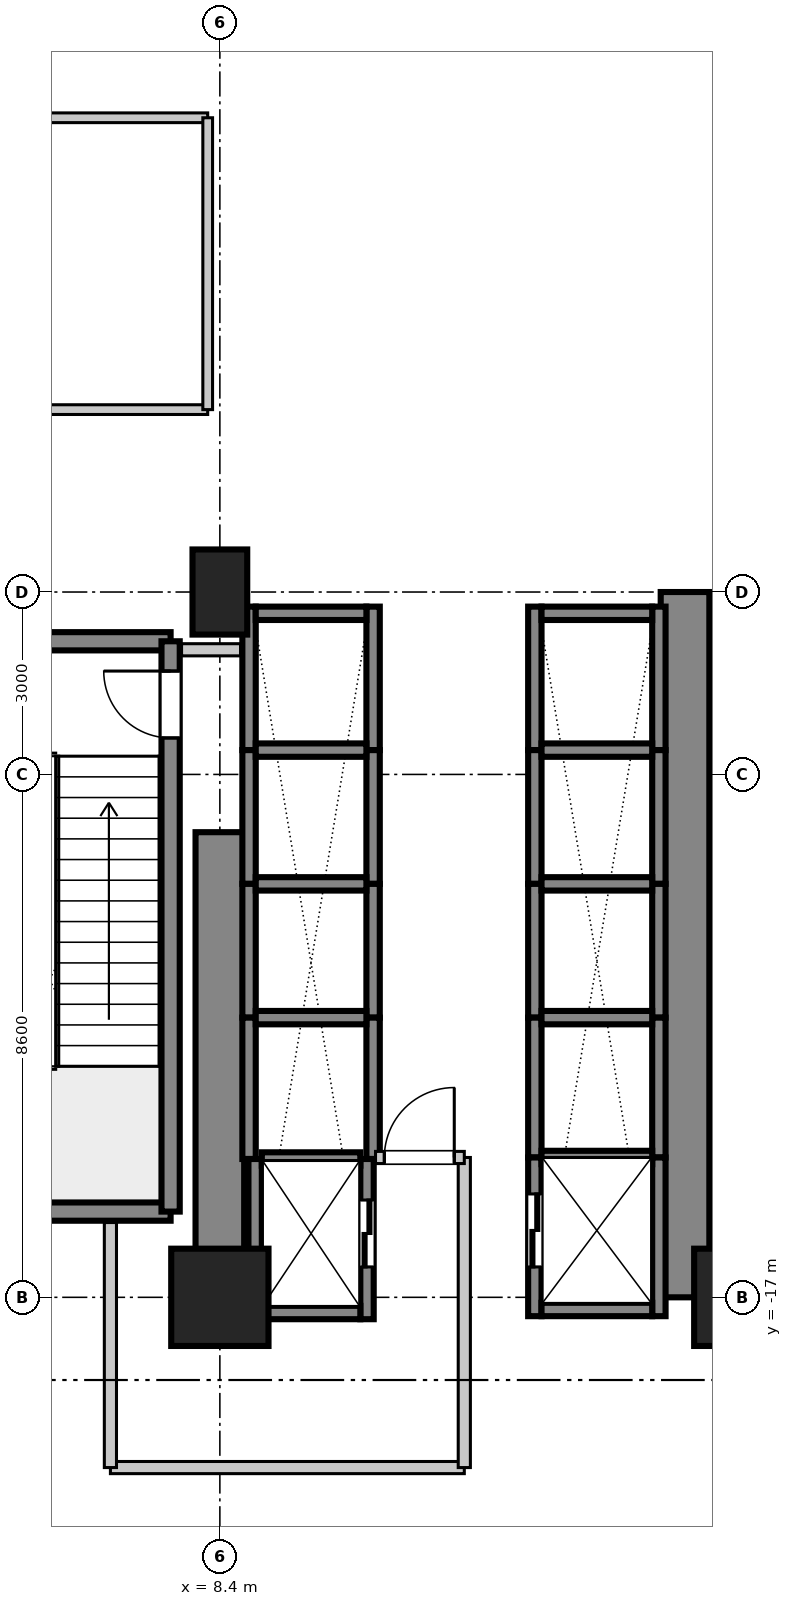
"""IFC4 building model, lengths in metres.
Left out: names, types, materials, properties, quantities, classifications, styles, units other than length and angle.
Written with IfcOpenShell. Run it as: python <this file> out.ifc"""

import sys

from ifc_helpers import new_model, si_unit, direction, frame, frame_2d, origin, origin_2d, place, context, subcontext, project, spatial, rectangle, extrude, source, transform, mapped, element, fill, save


model = new_model("IFC4")
c1 = context("Model", 3, precision=1e-05, world=origin(), true_north=direction((0.0, 1.0)))
c2 = subcontext(c1, "Body", "Model", "MODEL_VIEW")
j1 = project(units=[si_unit("LENGTHUNIT", "METRE"), si_unit("PLANEANGLEUNIT", "RADIAN")], contexts=[c1])
p1 = place(None, origin())
s1 = spatial("IfcSite", under=j1, at=p1, CompositionType="ELEMENT")
p2 = place(p1, origin())
s2 = spatial("IfcBuilding", under=s1, at=p2, CompositionType="ELEMENT")
p3 = place(p2, frame((0.0, 0.0, 27.0)))
s3 = spatial("IfcBuildingStorey", under=s2, at=p3, CompositionType="ELEMENT", Elevation=27.0)
m1 = source(origin(), c2, "Body", "SweptSolid", [
    extrude(rectangle(XDim=1.6, YDim=1.6, at=origin_2d()), origin(), (0.0, 0.0, 1.0), 5.355),
])
p4 = place(p3, frame((8.4, -17.0, 0.0), z_axis=(0.0, 0.0, 1.0), x_axis=(1.0, 0.0, 0.0)))
e1 = element("IfcColumn", 1, at=p4, inside=s3, PredefinedType="COLUMN", context=c2, shape_type="MappedRepresentation", body=[
    mapped(m1, transform((0.0, 0.0, 0.0), scale=1.0)),
])
m2 = source(origin(), c2, "Body", "SweptSolid", [
    extrude(rectangle(XDim=0.9, YDim=1.4, at=origin_2d()), origin(), (0.0, 0.0, 1.0), 5.355),
])
p5 = place(p3, frame((8.4, -5.4, 0.0), z_axis=(0.0, 0.0, 1.0), x_axis=(1.0, 0.0, 0.0)))
e2 = element("IfcColumn", 2, at=p5, inside=s3, PredefinedType="PILASTER", context=c2, shape_type="MappedRepresentation", body=[
    mapped(m2, transform((0.0, 0.0, 0.0), scale=1.0)),
])
p6 = place(p3, frame((17.0, -17.0, 0.0), z_axis=(0.0, 0.0, 1.0), x_axis=(1.0, 0.0, 0.0)))
e3 = element("IfcColumn", 3, at=p6, inside=s3, PredefinedType="COLUMN", context=c2, shape_type="MappedRepresentation", body=[
    mapped(m1, transform((0.0, 0.0, 0.0), scale=1.0)),
])
m3 = source(origin(), c2, "Body", "SweptSolid", [
    extrude(rectangle(XDim=7.65, YDim=0.8, at=frame_2d((3.825, 0.0))), origin(), (0.0, 0.0, 1.0), 5.12),
])
p7 = place(p3, frame((8.4, -17.0, 0.0), z_axis=(0.0, 0.0, 1.0), x_axis=(0.0, 1.0, 0.0)))
e4 = element("IfcWall", 4, at=p7, inside=s3, PredefinedType="SHEAR", context=c2, shape_type="MappedRepresentation", body=[
    mapped(m3, transform((0.0, 0.0, 0.0), scale=1.0)),
])
m4 = source(origin(), c2, "Body", "SweptSolid", [
    extrude(rectangle(XDim=11.6, YDim=0.8, at=frame_2d((5.8, 0.0))), origin(), (0.0, 0.0, 1.0), 5.12),
])
p8 = place(p3, frame((16.05, -17.0, 0.0), z_axis=(0.0, 0.0, 1.0), x_axis=(0.0, 1.0, 0.0)))
e5 = element("IfcWall", 5, at=p8, inside=s3, PredefinedType="SHEAR", context=c2, shape_type="MappedRepresentation", body=[
    mapped(m4, transform((0.0, 0.0, 0.0), scale=1.0)),
])
m5 = source(origin(), c2, "Body", "SweptSolid", [
    extrude(rectangle(XDim=3.98, YDim=0.3, at=frame_2d((1.99, 0.0))), origin(), (0.0, 0.0, 1.0), 5.12),
])
for number, where, z_axis, x_axis in (
    (6, (3.61, -15.59, 0.0), (0.0, 0.0, 1.0), (1.0, 0.0, 0.0)),
    (7, (3.61, -6.21, 0.0), (0.0, 0.0, 1.0), (1.0, 0.0, 0.0)),
):
    element("IfcWall", number, at=place(p3, frame(where, z_axis=z_axis, x_axis=x_axis)), inside=s3, PredefinedType="SHEAR", context=c2, shape_type="MappedRepresentation", body=[
        mapped(m5, transform((0.0, 0.0, 0.0), scale=1.0)),
    ])
m6 = source(origin(), c2, "Body", "SweptSolid", [
    extrude(rectangle(XDim=9.38, YDim=0.3, at=frame_2d((4.69, 0.0))), origin(), (0.0, 0.0, 1.0), 5.12),
])
p9 = place(p3, frame((7.59, -15.59, 0.0), z_axis=(0.0, 0.0, 1.0), x_axis=(0.0, 1.0, 0.0)))
e8 = element("IfcWall", 8, at=p9, inside=s3, PredefinedType="SHEAR", context=c2, shape_type="MappedRepresentation", body=[
    mapped(m6, transform((0.0, 0.0, 0.0), scale=1.0)),
])
p10 = place(p9, frame((7.79, 0.0, 0.0)))
e9 = element("IfcOpeningElement", 9, at=p10, cuts=e8, PredefinedType="OPENING", context=c2, shape_type="SweptSolid", body=[
    extrude(rectangle(XDim=1.1, YDim=2.15, at=frame_2d((0.55, 1.075))), frame((0.0, 0.16, 0.0), z_axis=(0.0, -1.0, 0.0), x_axis=(1.0, 0.0, 0.0)), (0.0, 0.0, 1.0), 0.32),
])
m7 = source(origin(), c2, "Body", "SweptSolid", [
    extrude(rectangle(XDim=2.36, YDim=0.22, at=frame_2d((1.18, 0.0))), origin(), (0.0, 0.0, 1.0), 5.12),
])
for number, where, z_axis, x_axis in (
    (10, (13.58, -8.0, 0.0), (0.0, 0.0, 1.0), (0.0, 1.0, 0.0)),
    (11, (15.62, -8.0, 0.0), (0.0, 0.0, 1.0), (0.0, 1.0, 0.0)),
):
    element("IfcWall", number, at=place(p3, frame(where, z_axis=z_axis, x_axis=x_axis)), inside=s3, PredefinedType="SHEAR", context=c2, shape_type="MappedRepresentation", body=[
        mapped(m7, transform((0.0, 0.0, 0.0), scale=1.0)),
    ])
m8 = source(origin(), c2, "Body", "SweptSolid", [
    extrude(rectangle(XDim=1.82, YDim=0.22, at=frame_2d((0.91, 0.0))), origin(), (0.0, 0.0, 1.0), 5.12),
])
p11 = place(p3, frame((13.69, -5.75, 0.0), z_axis=(0.0, 0.0, 1.0), x_axis=(1.0, 0.0, 0.0)))
e12 = element("IfcWall", 12, at=p11, inside=s3, PredefinedType="SHEAR", context=c2, shape_type="MappedRepresentation", body=[
    mapped(m8, transform((0.0, 0.0, 0.0), scale=1.0)),
])
m9 = source(origin(), c2, "Body", "SweptSolid", [
    extrude(rectangle(XDim=2.2, YDim=0.22, at=frame_2d((1.1, 0.0))), origin(), (0.0, 0.0, 1.0), 5.12),
])
for number, where, z_axis, x_axis in (
    (13, (13.58, -10.2, 0.0), (0.0, 0.0, 1.0), (0.0, 1.0, 0.0)),
    (14, (15.62, -10.2, 0.0), (0.0, 0.0, 1.0), (0.0, 1.0, 0.0)),
):
    element("IfcWall", number, at=place(p3, frame(where, z_axis=z_axis, x_axis=x_axis)), inside=s3, PredefinedType="SHEAR", context=c2, shape_type="MappedRepresentation", body=[
        mapped(m9, transform((0.0, 0.0, 0.0), scale=1.0)),
    ])
m10 = source(origin(), c2, "Body", "SweptSolid", [
    extrude(rectangle(XDim=1.82, YDim=0.22, at=frame_2d((0.91, 0.0))), origin(), (0.0, 0.0, 1.0), 5.4),
])
p12 = place(p3, frame((13.69, -8.0, 0.0), z_axis=(0.0, 0.0, 1.0), x_axis=(1.0, 0.0, 0.0)))
e15 = element("IfcWall", 15, at=p12, inside=s3, PredefinedType="SHEAR", context=c2, shape_type="MappedRepresentation", body=[
    mapped(m10, transform((0.0, 0.0, 0.0), scale=1.0)),
])
for number, where, z_axis, x_axis in (
    (16, (13.58, -12.4, 0.0), (0.0, 0.0, 1.0), (0.0, 1.0, 0.0)),
    (17, (15.62, -12.4, 0.0), (0.0, 0.0, 1.0), (0.0, 1.0, 0.0)),
):
    element("IfcWall", number, at=place(p3, frame(where, z_axis=z_axis, x_axis=x_axis)), inside=s3, PredefinedType="SHEAR", context=c2, shape_type="MappedRepresentation", body=[
        mapped(m9, transform((0.0, 0.0, 0.0), scale=1.0)),
    ])
p13 = place(p3, frame((13.69, -10.2, 0.0), z_axis=(0.0, 0.0, 1.0), x_axis=(1.0, 0.0, 0.0)))
e18 = element("IfcWall", 18, at=p13, inside=s3, PredefinedType="SHEAR", context=c2, shape_type="MappedRepresentation", body=[
    mapped(m10, transform((0.0, 0.0, 0.0), scale=1.0)),
])
m11 = source(origin(), c2, "Body", "SweptSolid", [
    extrude(rectangle(XDim=2.3, YDim=0.22, at=frame_2d((1.15, 0.0))), origin(), (0.0, 0.0, 1.0), 5.12),
])
for number, where, z_axis, x_axis in (
    (19, (13.58, -14.7, 0.0), (0.0, 0.0, 1.0), (0.0, 1.0, 0.0)),
    (20, (15.62, -14.7, 0.0), (0.0, 0.0, 1.0), (0.0, 1.0, 0.0)),
):
    element("IfcWall", number, at=place(p3, frame(where, z_axis=z_axis, x_axis=x_axis)), inside=s3, PredefinedType="SHEAR", context=c2, shape_type="MappedRepresentation", body=[
        mapped(m11, transform((0.0, 0.0, 0.0), scale=1.0)),
    ])
p14 = place(p3, frame((13.69, -12.4, 0.0), z_axis=(0.0, 0.0, 1.0), x_axis=(1.0, 0.0, 0.0)))
e21 = element("IfcWall", 21, at=p14, inside=s3, PredefinedType="SHEAR", context=c2, shape_type="MappedRepresentation", body=[
    mapped(m10, transform((0.0, 0.0, 0.0), scale=1.0)),
])
for number, where, z_axis, x_axis in (
    (22, (8.88, -8.0, 0.0), (0.0, 0.0, 1.0), (0.0, 1.0, 0.0)),
    (23, (10.92, -8.0, 0.0), (0.0, 0.0, 1.0), (0.0, 1.0, 0.0)),
):
    element("IfcWall", number, at=place(p3, frame(where, z_axis=z_axis, x_axis=x_axis)), inside=s3, PredefinedType="SHEAR", context=c2, shape_type="MappedRepresentation", body=[
        mapped(m7, transform((0.0, 0.0, 0.0), scale=1.0)),
    ])
p15 = place(p3, frame((8.99, -5.75, 0.0), z_axis=(0.0, 0.0, 1.0), x_axis=(1.0, 0.0, 0.0)))
e24 = element("IfcWall", 24, at=p15, inside=s3, PredefinedType="SHEAR", context=c2, shape_type="MappedRepresentation", body=[
    mapped(m8, transform((0.0, 0.0, 0.0), scale=1.0)),
])
for number, where, z_axis, x_axis in (
    (25, (8.88, -10.2, 0.0), (0.0, 0.0, 1.0), (0.0, 1.0, 0.0)),
    (26, (10.92, -10.2, 0.0), (0.0, 0.0, 1.0), (0.0, 1.0, 0.0)),
):
    element("IfcWall", number, at=place(p3, frame(where, z_axis=z_axis, x_axis=x_axis)), inside=s3, PredefinedType="SHEAR", context=c2, shape_type="MappedRepresentation", body=[
        mapped(m9, transform((0.0, 0.0, 0.0), scale=1.0)),
    ])
p16 = place(p3, frame((8.99, -8.0, 0.0), z_axis=(0.0, 0.0, 1.0), x_axis=(1.0, 0.0, 0.0)))
e27 = element("IfcWall", 27, at=p16, inside=s3, PredefinedType="SHEAR", context=c2, shape_type="MappedRepresentation", body=[
    mapped(m10, transform((0.0, 0.0, 0.0), scale=1.0)),
])
for number, where, z_axis, x_axis in (
    (28, (8.88, -12.4, 0.0), (0.0, 0.0, 1.0), (0.0, 1.0, 0.0)),
    (29, (10.92, -12.4, 0.0), (0.0, 0.0, 1.0), (0.0, 1.0, 0.0)),
):
    element("IfcWall", number, at=place(p3, frame(where, z_axis=z_axis, x_axis=x_axis)), inside=s3, PredefinedType="SHEAR", context=c2, shape_type="MappedRepresentation", body=[
        mapped(m9, transform((0.0, 0.0, 0.0), scale=1.0)),
    ])
p17 = place(p3, frame((8.99, -10.2, 0.0), z_axis=(0.0, 0.0, 1.0), x_axis=(1.0, 0.0, 0.0)))
e30 = element("IfcWall", 30, at=p17, inside=s3, PredefinedType="SHEAR", context=c2, shape_type="MappedRepresentation", body=[
    mapped(m10, transform((0.0, 0.0, 0.0), scale=1.0)),
])
m12 = source(origin(), c2, "Body", "SweptSolid", [
    extrude(rectangle(XDim=2.325, YDim=0.22, at=frame_2d((1.163, 0.0))), origin(), (0.0, 0.0, 1.0), 5.12),
])
for number, where, z_axis, x_axis in (
    (31, (8.88, -14.725, 0.0), (0.0, 0.0, 1.0), (0.0, 1.0, 0.0)),
    (32, (10.92, -14.725, 0.0), (0.0, 0.0, 1.0), (0.0, 1.0, 0.0)),
):
    element("IfcWall", number, at=place(p3, frame(where, z_axis=z_axis, x_axis=x_axis)), inside=s3, PredefinedType="SHEAR", context=c2, shape_type="MappedRepresentation", body=[
        mapped(m12, transform((0.0, 0.0, 0.0), scale=1.0)),
    ])
p18 = place(p3, frame((8.99, -12.4, 0.0), z_axis=(0.0, 0.0, 1.0), x_axis=(1.0, 0.0, 0.0)))
e33 = element("IfcWall", 33, at=p18, inside=s3, PredefinedType="SHEAR", context=c2, shape_type="MappedRepresentation", body=[
    mapped(m10, transform((0.0, 0.0, 0.0), scale=1.0)),
])
m13 = source(origin(), c2, "Body", "SweptSolid", [
    extrude(rectangle(XDim=2.635, YDim=0.22, at=frame_2d((1.317, 0.0))), origin(), (0.0, 0.0, 1.0), 5.12),
])
p19 = place(p3, frame((8.98, -17.36, 0.0), z_axis=(0.0, 0.0, 1.0), x_axis=(0.0, 1.0, 0.0)))
e34 = element("IfcWall", 34, at=p19, inside=s3, PredefinedType="SHEAR", context=c2, shape_type="MappedRepresentation", body=[
    mapped(m13, transform((0.0, 0.0, 0.0), scale=1.0)),
])
p20 = place(p3, frame((10.82, -17.36, 0.0), z_axis=(0.0, 0.0, 1.0), x_axis=(0.0, 1.0, 0.0)))
e35 = element("IfcWall", 35, at=p20, inside=s3, PredefinedType="SHEAR", context=c2, shape_type="MappedRepresentation", body=[
    mapped(m13, transform((0.0, 0.0, 0.0), scale=1.0)),
])
p21 = place(p20, frame((0.86, 0.0, 0.0)))
e36 = element("IfcOpeningElement", 36, at=p21, cuts=e35, PredefinedType="OPENING", context=c2, shape_type="SweptSolid", body=[
    extrude(rectangle(XDim=1.1, YDim=2.2, at=frame_2d((0.55, 1.1))), frame((0.0, 0.12, 0.0), z_axis=(0.0, -1.0, 0.0), x_axis=(1.0, 0.0, 0.0)), (0.0, 0.0, 1.0), 0.24),
])
m14 = source(origin(), c2, "Body", "SweptSolid", [
    extrude(rectangle(XDim=1.62, YDim=0.22, at=frame_2d((0.81, 0.0))), origin(), (0.0, 0.0, 1.0), 5.12),
])
p22 = place(p3, frame((9.09, -17.25, 0.0), z_axis=(0.0, 0.0, 1.0), x_axis=(1.0, 0.0, 0.0)))
e37 = element("IfcWall", 37, at=p22, inside=s3, PredefinedType="SHEAR", context=c2, shape_type="MappedRepresentation", body=[
    mapped(m14, transform((0.0, 0.0, 0.0), scale=1.0)),
])
m15 = source(origin(), c2, "Body", "SweptSolid", [
    extrude(rectangle(XDim=1.62, YDim=0.22, at=frame_2d((0.81, 0.0))), origin(), (0.0, 0.0, 1.0), 5.4),
])
p23 = place(p3, frame((9.09, -14.725, 0.0), z_axis=(0.0, 0.0, 1.0), x_axis=(1.0, 0.0, 0.0)))
e38 = element("IfcWall", 38, at=p23, inside=s3, PredefinedType="SHEAR", context=c2, shape_type="MappedRepresentation", body=[
    mapped(m15, transform((0.0, 0.0, 0.0), scale=1.0)),
])
m16 = source(origin(), c2, "Body", "SweptSolid", [
    extrude(rectangle(XDim=2.61, YDim=0.22, at=frame_2d((1.305, 0.0))), origin(), (0.0, 0.0, 1.0), 5.12),
])
p24 = place(p3, frame((13.58, -17.31, 0.0), z_axis=(0.0, 0.0, 1.0), x_axis=(0.0, 1.0, 0.0)))
e39 = element("IfcWall", 39, at=p24, inside=s3, PredefinedType="SHEAR", context=c2, shape_type="MappedRepresentation", body=[
    mapped(m16, transform((0.0, 0.0, 0.0), scale=1.0)),
])
p25 = place(p24, frame((0.81, 0.0, 0.0)))
e40 = element("IfcOpeningElement", 40, at=p25, cuts=e39, PredefinedType="OPENING", context=c2, shape_type="SweptSolid", body=[
    extrude(rectangle(XDim=1.2, YDim=2.2, at=frame_2d((0.6, 1.1))), frame((0.0, 0.12, 0.0), z_axis=(0.0, -1.0, 0.0), x_axis=(1.0, 0.0, 0.0)), (0.0, 0.0, 1.0), 0.24),
])
p26 = place(p3, frame((15.62, -17.31, 0.0), z_axis=(0.0, 0.0, 1.0), x_axis=(0.0, 1.0, 0.0)))
e41 = element("IfcWall", 41, at=p26, inside=s3, PredefinedType="SHEAR", context=c2, shape_type="MappedRepresentation", body=[
    mapped(m16, transform((0.0, 0.0, 0.0), scale=1.0)),
])
p27 = place(p3, frame((13.69, -17.2, 0.0), z_axis=(0.0, 0.0, 1.0), x_axis=(1.0, 0.0, 0.0)))
e42 = element("IfcWall", 42, at=p27, inside=s3, PredefinedType="SHEAR", context=c2, shape_type="MappedRepresentation", body=[
    mapped(m8, transform((0.0, 0.0, 0.0), scale=1.0)),
])
p28 = place(p3, frame((13.69, -14.7, 0.0), z_axis=(0.0, 0.0, 1.0), x_axis=(1.0, 0.0, 0.0)))
e43 = element("IfcWall", 43, at=p28, inside=s3, PredefinedType="SHEAR", context=c2, shape_type="MappedRepresentation", body=[
    mapped(m10, transform((0.0, 0.0, 0.0), scale=1.0)),
])
m17 = source(origin(), c2, "Body", "SweptSolid", [
    extrude(rectangle(XDim=5.82, YDim=0.2, at=frame_2d((2.91, 0.0))), origin(), (0.0, 0.0, 1.0), 3.24),
])
p29 = place(p3, frame((6.6, -19.8, 0.0), z_axis=(0.0, 0.0, 1.0), x_axis=(1.0, 0.0, 0.0)))
e44 = element("IfcWall", 44, at=p29, inside=s3, PredefinedType="PARTITIONING", context=c2, shape_type="MappedRepresentation", body=[
    mapped(m17, transform((0.0, 0.0, 0.0), scale=1.0)),
])
m18 = source(origin(), c2, "Body", "SweptSolid", [
    extrude(rectangle(XDim=4.03, YDim=0.2, at=frame_2d((2.015, 0.0))), origin(), (0.0, 0.0, 1.0), 3.24),
])
p30 = place(p3, frame((6.6, -19.8, 0.0), z_axis=(0.0, 0.0, 1.0), x_axis=(0.0, 1.0, 0.0)))
e45 = element("IfcWall", 45, at=p30, inside=s3, PredefinedType="PARTITIONING", context=c2, shape_type="MappedRepresentation", body=[
    mapped(m18, transform((0.0, 0.0, 0.0), scale=1.0)),
])
m19 = source(origin(), c2, "Body", "SweptSolid", [
    extrude(rectangle(XDim=5.1, YDim=0.2, at=frame_2d((2.55, 0.0))), origin(), (0.0, 0.0, 1.0), 3.24),
])
p31 = place(p3, frame((12.42, -19.8, 0.0), z_axis=(0.0, 0.0, 1.0), x_axis=(0.0, 1.0, 0.0)))
e46 = element("IfcWall", 46, at=p31, inside=s3, PredefinedType="PARTITIONING", context=c2, shape_type="MappedRepresentation", body=[
    mapped(m19, transform((0.0, 0.0, 0.0), scale=1.0)),
])
m20 = source(origin(), c2, "Body", "SweptSolid", [
    extrude(rectangle(XDim=1.46, YDim=0.2, at=frame_2d((0.73, 0.0))), origin(), (0.0, 0.0, 1.0), 3.24),
])
p32 = place(p3, frame((10.96, -14.7, 0.0), z_axis=(0.0, 0.0, 1.0), x_axis=(1.0, 0.0, 0.0)))
e47 = element("IfcWall", 47, at=p32, inside=s3, PredefinedType="PARTITIONING", context=c2, shape_type="MappedRepresentation", body=[
    mapped(m20, transform((0.0, 0.0, 0.0), scale=1.0)),
])
p33 = place(p32, frame((0.145, 0.0, 0.0)))
e48 = element("IfcOpeningElement", 48, at=p33, cuts=e47, PredefinedType="OPENING", context=c2, shape_type="SweptSolid", body=[
    extrude(rectangle(XDim=1.15, YDim=2.15, at=frame_2d((0.575, 1.075))), frame((0.0, 0.11, 0.0), z_axis=(0.0, -1.0, 0.0), x_axis=(1.0, 0.0, 0.0)), (0.0, 0.0, 1.0), 0.22),
])
m21 = source(origin(), c2, "Body", "SweptSolid", [
    extrude(rectangle(XDim=0.97, YDim=0.2, at=frame_2d((0.485, 0.0))), origin(), (0.0, 0.0, 1.0), 3.24),
])
p34 = place(p3, frame((7.77, -6.35, 0.0), z_axis=(0.0, 0.0, 1.0), x_axis=(1.0, 0.0, 0.0)))
e49 = element("IfcWall", 49, at=p34, inside=s3, PredefinedType="PARTITIONING", context=c2, shape_type="MappedRepresentation", body=[
    mapped(m21, transform((0.0, 0.0, 0.0), scale=1.0)),
])
m22 = source(origin(), c2, "Body", "SweptSolid", [
    extrude(rectangle(XDim=17.0, YDim=0.16, at=frame_2d((8.5, 0.0))), origin(), (0.0, 0.0, 1.0), 3.24),
])
p35 = place(p3, frame((-8.8, -2.4, 0.0), z_axis=(0.0, 0.0, 1.0), x_axis=(1.0, 0.0, 0.0)))
e50 = element("IfcWall", 50, at=p35, inside=s3, PredefinedType="PARTITIONING", context=c2, shape_type="MappedRepresentation", body=[
    mapped(m22, transform((0.0, 0.0, 0.0), scale=1.0)),
])
p36 = place(p3, frame((-8.8, 2.4, 0.0), z_axis=(0.0, 0.0, 1.0), x_axis=(1.0, 0.0, 0.0)))
e51 = element("IfcWall", 51, at=p36, inside=s3, PredefinedType="PARTITIONING", context=c2, shape_type="MappedRepresentation", body=[
    mapped(m22, transform((0.0, 0.0, 0.0), scale=1.0)),
])
p37 = place(p36, frame((2.449, 0.0, 0.0)))
e52 = element("IfcOpeningElement", 52, at=p37, cuts=e51, PredefinedType="OPENING", context=c2, shape_type="SweptSolid", body=[
    extrude(rectangle(XDim=1.5, YDim=2.15, at=frame_2d((0.75, 1.075))), frame((0.0, 0.09, 0.0), z_axis=(0.0, -1.0, 0.0), x_axis=(1.0, 0.0, 0.0)), (0.0, 0.0, 1.0), 0.18),
])
m23 = source(origin(), c2, "Body", "SweptSolid", [
    extrude(rectangle(XDim=4.8, YDim=0.16, at=frame_2d((2.4, 0.0))), origin(), (0.0, 0.0, 1.0), 3.24),
])
p38 = place(p3, frame((8.2, -2.4, 0.0), z_axis=(0.0, 0.0, 1.0), x_axis=(0.0, 1.0, 0.0)))
e53 = element("IfcWall", 53, at=p38, inside=s3, PredefinedType="PARTITIONING", context=c2, shape_type="MappedRepresentation", body=[
    mapped(m23, transform((0.0, 0.0, 0.0), scale=1.0)),
])
m24 = source(origin(), c2, "Body", "SweptSolid", [
    extrude(rectangle(XDim=1.1, YDim=2.15, at=frame_2d((0.55, 1.075))), frame((0.0, 0.025, 0.0), z_axis=(0.0, -1.0, 0.0), x_axis=(1.0, 0.0, 0.0)), (0.0, 0.0, 1.0), 0.05),
])
p39 = place(p10, origin())
e54 = element("IfcDoor", 54, at=p39, inside=s3, OperationType="SINGLE_SWING_RIGHT", PredefinedType="DOOR", context=c2, shape_type="MappedRepresentation", body=[
    mapped(m24, transform((0.0, 0.0, 0.0), scale=1.0)),
])
fill(e9, e54)
m25 = source(origin(), c2, "Body", "SweptSolid", [
    extrude(rectangle(XDim=1.1, YDim=2.2, at=frame_2d((0.55, 1.1))), frame((0.0, 0.025, 0.0), z_axis=(0.0, -1.0, 0.0), x_axis=(1.0, 0.0, 0.0)), (0.0, 0.0, 1.0), 0.05),
])
p40 = place(p21, frame((1.1, 0.0, 0.0), z_axis=(0.0, 0.0, 1.0), x_axis=(-1.0, 0.0, 0.0)))
e55 = element("IfcDoor", 55, at=p40, inside=s3, OperationType="DOUBLE_DOOR_SLIDING", PredefinedType="DOOR", context=c2, shape_type="MappedRepresentation", body=[
    mapped(m25, transform((0.0, 0.0, 0.0), scale=1.0)),
])
fill(e36, e55)
m26 = source(origin(), c2, "Body", "SweptSolid", [
    extrude(rectangle(XDim=1.2, YDim=2.2, at=frame_2d((0.6, 1.1))), frame((0.0, 0.025, 0.0), z_axis=(0.0, -1.0, 0.0), x_axis=(1.0, 0.0, 0.0)), (0.0, 0.0, 1.0), 0.05),
])
p41 = place(p25, origin())
e56 = element("IfcDoor", 56, at=p41, inside=s3, OperationType="DOUBLE_DOOR_SLIDING", PredefinedType="DOOR", context=c2, shape_type="MappedRepresentation", body=[
    mapped(m26, transform((0.0, 0.0, 0.0), scale=1.0)),
])
fill(e40, e56)
m27 = source(origin(), c2, "Body", "SweptSolid", [
    extrude(rectangle(XDim=1.15, YDim=2.15, at=frame_2d((0.575, 1.075))), frame((0.0, 0.025, 0.0), z_axis=(0.0, -1.0, 0.0), x_axis=(1.0, 0.0, 0.0)), (0.0, 0.0, 1.0), 0.05),
])
p42 = place(p33, origin())
e57 = element("IfcDoor", 57, at=p42, inside=s3, OperationType="SINGLE_SWING_RIGHT", PredefinedType="DOOR", context=c2, shape_type="MappedRepresentation", body=[
    mapped(m27, transform((0.0, 0.0, 0.0), scale=1.0)),
])
fill(e48, e57)
save(model, sys.argv[1])
